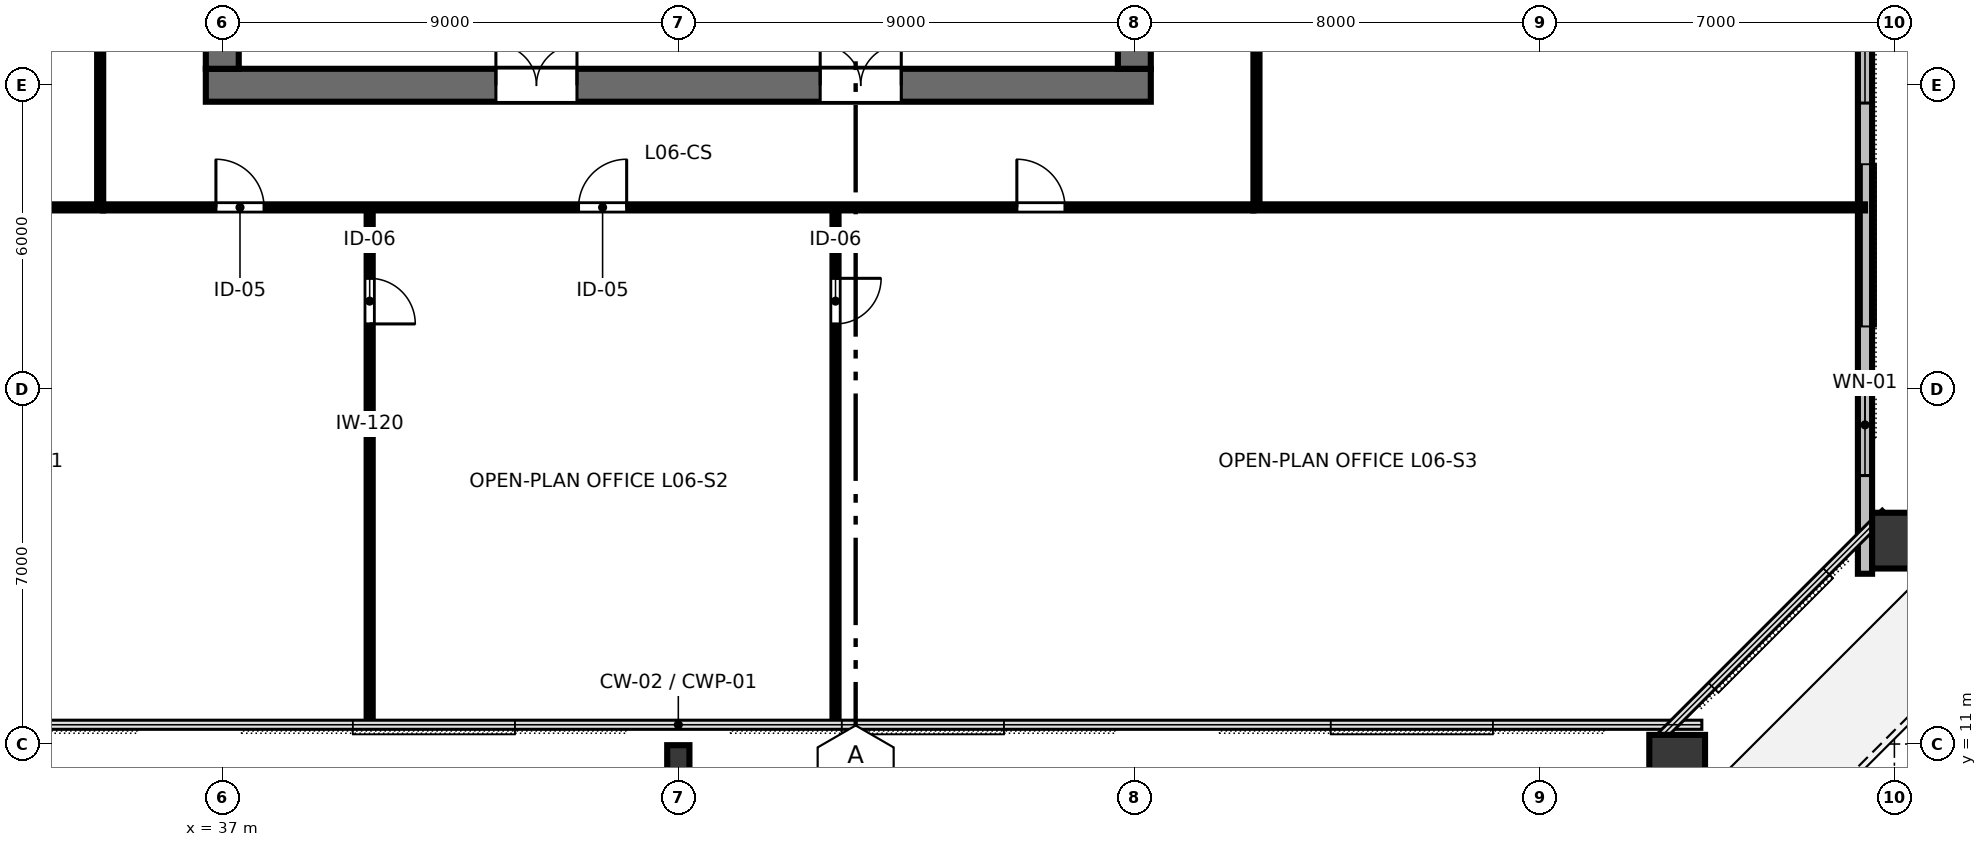
"""IFC4 building model, lengths in metres.
Left out: names, types, materials, properties, quantities, classifications, styles, units other than length and angle.
Written with IfcOpenShell. Run it as: python <this file> out.ifc"""

import sys

from ifc_helpers import new_model, si_unit, direction, frame, frame_2d, origin, origin_2d, place, context, subcontext, project, spatial, rectangle, hollow_rectangle, i_section, extrude, element, fill, save


model = new_model("IFC4")
c1 = context("Model", 3, precision=1e-05, world=origin(), true_north=direction((0.0, 1.0)))
c2 = subcontext(c1, "Body", "Model", "MODEL_VIEW")
j1 = project(units=[si_unit("LENGTHUNIT", "METRE"), si_unit("PLANEANGLEUNIT", "RADIAN")], contexts=[c1])
p1 = place(None, origin())
s1 = spatial("IfcSite", under=j1, at=p1, CompositionType="ELEMENT")
p2 = place(p1, origin())
s2 = spatial("IfcBuilding", under=s1, at=p2, CompositionType="ELEMENT")
p3 = place(p2, frame((0.0, 0.0, 28.0)))
s3 = spatial("IfcBuildingStorey", under=s2, at=p3, CompositionType="ELEMENT", Elevation=28.0)
p4 = place(p3, frame((36.675, 24.0, 0.0), z_axis=(0.0, 0.0, 1.0), x_axis=(1.0, 0.0, 0.0)))
e1 = element("IfcWall", 1, at=p4, inside=s3, PredefinedType="SHEAR", context=c2, shape_type="SweptSolid", body=[
    extrude(rectangle(XDim=18.65, YDim=0.65, at=frame_2d((9.325, 0.0))), origin(), (0.0, 0.0, 1.0), 3.36),
])
p5 = place(p4, frame((5.725, 0.0, 0.0)))
e2 = element("IfcOpeningElement", 2, at=p5, cuts=e1, PredefinedType="OPENING", context=c2, shape_type="SweptSolid", body=[
    extrude(rectangle(XDim=1.6, YDim=2.15, at=frame_2d((0.8, 1.075))), frame((0.0, 0.335, 0.0), z_axis=(0.0, -1.0, 0.0), x_axis=(1.0, 0.0, 0.0)), (0.0, 0.0, 1.0), 0.67),
])
p6 = place(p4, frame((12.125, 0.0, 0.0)))
e3 = element("IfcOpeningElement", 3, at=p6, cuts=e1, PredefinedType="OPENING", context=c2, shape_type="SweptSolid", body=[
    extrude(rectangle(XDim=1.6, YDim=2.15, at=frame_2d((0.8, 1.075))), frame((0.0, 0.335, 0.0), z_axis=(0.0, -1.0, 0.0), x_axis=(1.0, 0.0, 0.0)), (0.0, 0.0, 1.0), 0.67),
])
p7 = place(p3, frame((37.0, 24.325, 0.0), z_axis=(0.0, 0.0, 1.0), x_axis=(0.0, 1.0, 0.0)))
e4 = element("IfcWall", 4, at=p7, inside=s3, PredefinedType="SHEAR", context=c2, shape_type="SweptSolid", body=[
    extrude(rectangle(XDim=15.35, YDim=0.65, at=frame_2d((7.675, 0.0))), origin(), (0.0, 0.0, 1.0), 3.36),
])
p8 = place(p7, frame((5.2, 0.0, 0.0)))
e5 = element("IfcOpeningElement", 5, at=p8, cuts=e4, PredefinedType="OPENING", context=c2, shape_type="SweptSolid", body=[
    extrude(rectangle(XDim=1.15, YDim=2.15, at=frame_2d((0.575, 1.075))), frame((0.0, 0.335, 0.0), z_axis=(0.0, -1.0, 0.0), x_axis=(1.0, 0.0, 0.0)), (0.0, 0.0, 1.0), 0.67),
])
p9 = place(p3, frame((55.0, 24.325, 0.0), z_axis=(0.0, 0.0, 1.0), x_axis=(0.0, 1.0, 0.0)))
e6 = element("IfcWall", 6, at=p9, inside=s3, PredefinedType="SHEAR", context=c2, shape_type="SweptSolid", body=[
    extrude(rectangle(XDim=15.35, YDim=0.65, at=frame_2d((7.675, 0.0))), origin(), (0.0, 0.0, 1.0), 3.36),
])
p10 = place(p9, frame((5.2, 0.0, 0.0)))
e7 = element("IfcOpeningElement", 7, at=p10, cuts=e6, PredefinedType="OPENING", context=c2, shape_type="SweptSolid", body=[
    extrude(rectangle(XDim=1.15, YDim=2.15, at=frame_2d((0.575, 1.075))), frame((0.0, 0.335, 0.0), z_axis=(0.0, -1.0, 0.0), x_axis=(1.0, 0.0, 0.0)), (0.0, 0.0, 1.0), 0.67),
])
p11 = place(p3, frame((46.0, 10.72, 0.0), z_axis=(0.0, 0.0, 1.0), x_axis=(1.0, 0.0, 0.0)))
e8 = element("IfcColumn", 8, at=p11, inside=s3, PredefinedType="COLUMN", context=c2, shape_type="SweptSolid", body=[
    extrude(i_section(OverallWidth=0.439, OverallDepth=0.514, WebThickness=0.06, FlangeThickness=0.097, FilletRadius=0.025, at=origin_2d()), origin(), (0.0, 0.0, 1.0), 3.358),
])
for number, where, z_axis, x_axis in (
    (9, (65.713, 10.531, 0.0), (0.0, 0.0, 1.0), (1.0, 0.0, 0.0)),
    (10, (70.211, 15.013, 0.0), (0.0, 0.0, 1.0), (0.0, 1.0, 0.0)),
):
    element("IfcColumn", number, at=place(p3, frame(where, z_axis=z_axis, x_axis=x_axis)), inside=s3, PredefinedType="COLUMN", context=c2, shape_type="SweptSolid", body=[
        extrude(hollow_rectangle(XDim=1.1, YDim=1.3, WallThickness=0.07, at=origin_2d()), origin(), (0.0, 0.0, 1.0), 3.358),
    ])
p12 = place(p3, frame((69.42, 14.36, 0.0), z_axis=(0.0, 0.0, 1.0), x_axis=(0.0, 1.0, 0.0)))
e11 = element("IfcWall", 11, at=p12, inside=s3, PredefinedType="STANDARD", context=c2, shape_type="SweptSolid", body=[
    extrude(rectangle(XDim=35.28, YDim=0.28, at=frame_2d((17.64, 0.0))), origin(), (0.0, 0.0, 1.0), 3.36),
])
p13 = place(p12, frame((22.04, 0.0, 0.0)))
e12 = element("IfcOpeningElement", 12, at=p13, cuts=e11, PredefinedType="OPENING", context=c2, shape_type="SweptSolid", body=[
    extrude(rectangle(XDim=1.6, YDim=2.15, at=frame_2d((0.8, 1.075))), frame((0.0, 0.15, 0.0), z_axis=(0.0, -1.0, 0.0), x_axis=(1.0, 0.0, 0.0)), (0.0, 0.0, 1.0), 0.3),
])
p14 = place(p12, frame((1.938, 0.0, 0.8)))
e13 = element("IfcOpeningElement", 13, at=p14, cuts=e11, PredefinedType="OPENING", context=c2, shape_type="SweptSolid", body=[
    extrude(rectangle(XDim=2.0, YDim=1.95, at=frame_2d((1.0, 0.975))), frame((0.0, 0.15, 0.0), z_axis=(0.0, -1.0, 0.0), x_axis=(1.0, 0.0, 0.0)), (0.0, 0.0, 1.0), 0.3),
])
p15 = place(p12, frame((9.289, 0.0, 0.8)))
e14 = element("IfcOpeningElement", 14, at=p15, cuts=e11, PredefinedType="OPENING", context=c2, shape_type="SweptSolid", body=[
    extrude(rectangle(XDim=2.0, YDim=1.95, at=frame_2d((1.0, 0.975))), frame((0.0, 0.15, 0.0), z_axis=(0.0, -1.0, 0.0), x_axis=(1.0, 0.0, 0.0)), (0.0, 0.0, 1.0), 0.3),
])
p16 = place(p12, frame((12.964, 0.0, 0.8)))
e15 = element("IfcOpeningElement", 15, at=p16, cuts=e11, PredefinedType="OPENING", context=c2, shape_type="SweptSolid", body=[
    extrude(rectangle(XDim=2.0, YDim=1.95, at=frame_2d((1.0, 0.975))), frame((0.0, 0.15, 0.0), z_axis=(0.0, -1.0, 0.0), x_axis=(1.0, 0.0, 0.0)), (0.0, 0.0, 1.0), 0.3),
])
p17 = place(p12, frame((31.342, 0.0, 0.8)))
e16 = element("IfcOpeningElement", 16, at=p17, cuts=e11, PredefinedType="OPENING", context=c2, shape_type="SweptSolid", body=[
    extrude(rectangle(XDim=2.0, YDim=1.95, at=frame_2d((1.0, 0.975))), frame((0.0, 0.15, 0.0), z_axis=(0.0, -1.0, 0.0), x_axis=(1.0, 0.0, 0.0)), (0.0, 0.0, 1.0), 0.3),
])
p18 = place(p3, frame((39.909, 21.59, 0.0), z_axis=(0.0, 0.0, 1.0), x_axis=(0.0, -1.0, 0.0)))
e17 = element("IfcWall", 17, at=p18, inside=s3, PredefinedType="PARTITIONING", context=c2, shape_type="SweptSolid", body=[
    extrude(rectangle(XDim=10.21, YDim=0.12, at=frame_2d((5.105, 0.0))), origin(), (0.0, 0.0, 1.0), 2.64),
])
p19 = place(p18, frame((1.4, 0.0, 0.0)))
e18 = element("IfcOpeningElement", 18, at=p19, cuts=e17, PredefinedType="OPENING", context=c2, shape_type="SweptSolid", body=[
    extrude(rectangle(XDim=0.9, YDim=2.15, at=frame_2d((0.45, 1.075))), frame((0.0, 0.07, 0.0), z_axis=(0.0, -1.0, 0.0), x_axis=(1.0, 0.0, 0.0)), (0.0, 0.0, 1.0), 0.14),
])
p20 = place(p3, frame((49.102, 21.59, 0.0), z_axis=(0.0, 0.0, 1.0), x_axis=(0.0, -1.0, 0.0)))
e19 = element("IfcWall", 19, at=p20, inside=s3, PredefinedType="PARTITIONING", context=c2, shape_type="SweptSolid", body=[
    extrude(rectangle(XDim=10.21, YDim=0.12, at=frame_2d((5.105, 0.0))), origin(), (0.0, 0.0, 1.0), 2.64),
])
p21 = place(p20, frame((1.4, 0.0, 0.0)))
e20 = element("IfcOpeningElement", 20, at=p21, cuts=e19, PredefinedType="OPENING", context=c2, shape_type="SweptSolid", body=[
    extrude(rectangle(XDim=0.9, YDim=2.15, at=frame_2d((0.45, 1.075))), frame((0.0, 0.07, 0.0), z_axis=(0.0, -1.0, 0.0), x_axis=(1.0, 0.0, 0.0)), (0.0, 0.0, 1.0), 0.14),
])
p22 = place(p3, frame((34.65, 21.59, 0.0), z_axis=(0.0, 0.0, 1.0), x_axis=(1.0, 0.0, 0.0)))
e21 = element("IfcWall", 21, at=p22, inside=s3, PredefinedType="PARTITIONING", context=c2, shape_type="SweptSolid", body=[
    extrude(rectangle(XDim=22.7, YDim=0.12, at=frame_2d((11.35, 0.0))), origin(), (0.0, 0.0, 1.0), 2.64),
])
p23 = place(p22, frame((2.224, 0.0, 0.0)))
e22 = element("IfcOpeningElement", 22, at=p23, cuts=e21, PredefinedType="OPENING", context=c2, shape_type="SweptSolid", body=[
    extrude(rectangle(XDim=0.95, YDim=2.15, at=frame_2d((0.475, 1.075))), frame((0.0, 0.07, 0.0), z_axis=(0.0, -1.0, 0.0), x_axis=(1.0, 0.0, 0.0)), (0.0, 0.0, 1.0), 0.14),
])
p24 = place(p22, frame((9.381, 0.0, 0.0)))
e23 = element("IfcOpeningElement", 23, at=p24, cuts=e21, PredefinedType="OPENING", context=c2, shape_type="SweptSolid", body=[
    extrude(rectangle(XDim=0.95, YDim=2.15, at=frame_2d((0.475, 1.075))), frame((0.0, 0.07, 0.0), z_axis=(0.0, -1.0, 0.0), x_axis=(1.0, 0.0, 0.0)), (0.0, 0.0, 1.0), 0.14),
])
p25 = place(p22, frame((18.031, 0.0, 0.0)))
e24 = element("IfcOpeningElement", 24, at=p25, cuts=e21, PredefinedType="OPENING", context=c2, shape_type="SweptSolid", body=[
    extrude(rectangle(XDim=0.95, YDim=2.15, at=frame_2d((0.475, 1.075))), frame((0.0, 0.07, 0.0), z_axis=(0.0, -1.0, 0.0), x_axis=(1.0, 0.0, 0.0)), (0.0, 0.0, 1.0), 0.14),
])
p26 = place(p3, frame((34.59, 21.65, 0.0), z_axis=(0.0, 0.0, 1.0), x_axis=(0.0, 1.0, 0.0)))
e25 = element("IfcWall", 25, at=p26, inside=s3, PredefinedType="PARTITIONING", context=c2, shape_type="SweptSolid", body=[
    extrude(rectangle(XDim=20.7, YDim=0.12, at=frame_2d((10.35, 0.0))), origin(), (0.0, 0.0, 1.0), 2.64),
])
p27 = place(p26, frame((3.161, 0.0, 0.0)))
e26 = element("IfcOpeningElement", 26, at=p27, cuts=e25, PredefinedType="OPENING", context=c2, shape_type="SweptSolid", body=[
    extrude(rectangle(XDim=0.95, YDim=2.15, at=frame_2d((0.475, 1.075))), frame((0.0, 0.07, 0.0), z_axis=(0.0, -1.0, 0.0), x_axis=(1.0, 0.0, 0.0)), (0.0, 0.0, 1.0), 0.14),
])
p28 = place(p26, frame((13.311, 0.0, 0.0)))
e27 = element("IfcOpeningElement", 27, at=p28, cuts=e25, PredefinedType="OPENING", context=c2, shape_type="SweptSolid", body=[
    extrude(rectangle(XDim=0.95, YDim=2.15, at=frame_2d((0.475, 1.075))), frame((0.0, 0.07, 0.0), z_axis=(0.0, -1.0, 0.0), x_axis=(1.0, 0.0, 0.0)), (0.0, 0.0, 1.0), 0.14),
])
p29 = place(p3, frame((57.41, 21.65, 0.0), z_axis=(0.0, 0.0, 1.0), x_axis=(0.0, 1.0, 0.0)))
e28 = element("IfcWall", 28, at=p29, inside=s3, PredefinedType="PARTITIONING", context=c2, shape_type="SweptSolid", body=[
    extrude(rectangle(XDim=20.7, YDim=0.12, at=frame_2d((10.35, 0.0))), origin(), (0.0, 0.0, 1.0), 2.64),
])
p30 = place(p29, frame((5.31, 0.0, 0.0)))
e29 = element("IfcOpeningElement", 29, at=p30, cuts=e28, PredefinedType="OPENING", context=c2, shape_type="SweptSolid", body=[
    extrude(rectangle(XDim=0.95, YDim=2.15, at=frame_2d((0.475, 1.075))), frame((0.0, 0.07, 0.0), z_axis=(0.0, -1.0, 0.0), x_axis=(1.0, 0.0, 0.0)), (0.0, 0.0, 1.0), 0.14),
])
p31 = place(p29, frame((15.459, 0.0, 0.0)))
e30 = element("IfcOpeningElement", 30, at=p31, cuts=e28, PredefinedType="OPENING", context=c2, shape_type="SweptSolid", body=[
    extrude(rectangle(XDim=0.95, YDim=2.15, at=frame_2d((0.475, 1.075))), frame((0.0, 0.07, 0.0), z_axis=(0.0, -1.0, 0.0), x_axis=(1.0, 0.0, 0.0)), (0.0, 0.0, 1.0), 0.14),
])
for number, where, z_axis, x_axis in (
    (31, (34.65, 21.59, 0.0), (0.0, 0.0, 1.0), (-1.0, 0.0, 0.0)),
    (32, (57.35, 21.59, 0.0), (0.0, 0.0, 1.0), (1.0, 0.0, 0.0)),
):
    element("IfcWall", number, at=place(p3, frame(where, z_axis=z_axis, x_axis=x_axis)), inside=s3, PredefinedType="PARTITIONING", context=c2, shape_type="SweptSolid", body=[
        extrude(rectangle(XDim=12.07, YDim=0.12, at=frame_2d((6.035, 0.0))), origin(), (0.0, 0.0, 1.0), 2.64),
    ])
p32 = place(p14, origin())
e33 = element("IfcWindow", 33, at=p32, inside=s3, PartitioningType="SINGLE_PANEL", PredefinedType="WINDOW", context=c2, shape_type="SweptSolid", body=[
    extrude(rectangle(XDim=2.0, YDim=1.95, at=frame_2d((1.0, 0.975))), frame((0.0, 0.03, 0.0), z_axis=(0.0, -1.0, 0.0), x_axis=(1.0, 0.0, 0.0)), (0.0, 0.0, 1.0), 0.06),
])
fill(e13, e33)
p33 = place(p15, origin())
e34 = element("IfcWindow", 34, at=p33, inside=s3, PartitioningType="SINGLE_PANEL", PredefinedType="WINDOW", context=c2, shape_type="SweptSolid", body=[
    extrude(rectangle(XDim=2.0, YDim=1.95, at=frame_2d((1.0, 0.975))), frame((0.0, 0.03, 0.0), z_axis=(0.0, -1.0, 0.0), x_axis=(1.0, 0.0, 0.0)), (0.0, 0.0, 1.0), 0.06),
])
fill(e14, e34)
p34 = place(p5, origin())
e35 = element("IfcDoor", 35, at=p34, inside=s3, OperationType="DOUBLE_DOOR_SINGLE_SWING", PredefinedType="DOOR", context=c2, shape_type="SweptSolid", body=[
    extrude(rectangle(XDim=1.6, YDim=2.15, at=frame_2d((0.8, 1.075))), frame((0.0, 0.025, 0.0), z_axis=(0.0, -1.0, 0.0), x_axis=(1.0, 0.0, 0.0)), (0.0, 0.0, 1.0), 0.05),
])
fill(e2, e35)
p35 = place(p6, origin())
e36 = element("IfcDoor", 36, at=p35, inside=s3, OperationType="DOUBLE_DOOR_SINGLE_SWING", PredefinedType="DOOR", context=c2, shape_type="SweptSolid", body=[
    extrude(rectangle(XDim=1.6, YDim=2.15, at=frame_2d((0.8, 1.075))), frame((0.0, 0.025, 0.0), z_axis=(0.0, -1.0, 0.0), x_axis=(1.0, 0.0, 0.0)), (0.0, 0.0, 1.0), 0.05),
])
fill(e3, e36)
p36 = place(p19, origin())
e37 = element("IfcDoor", 37, at=p36, inside=s3, OperationType="SINGLE_SWING_RIGHT", PredefinedType="DOOR", context=c2, shape_type="SweptSolid", body=[
    extrude(rectangle(XDim=0.9, YDim=2.15, at=frame_2d((0.45, 1.075))), frame((0.0, 0.025, 0.0), z_axis=(0.0, -1.0, 0.0), x_axis=(1.0, 0.0, 0.0)), (0.0, 0.0, 1.0), 0.05),
])
fill(e18, e37)
p37 = place(p21, origin())
e38 = element("IfcDoor", 38, at=p37, inside=s3, OperationType="SINGLE_SWING_LEFT", PredefinedType="DOOR", context=c2, shape_type="SweptSolid", body=[
    extrude(rectangle(XDim=0.9, YDim=2.15, at=frame_2d((0.45, 1.075))), frame((0.0, 0.025, 0.0), z_axis=(0.0, -1.0, 0.0), x_axis=(1.0, 0.0, 0.0)), (0.0, 0.0, 1.0), 0.05),
])
fill(e20, e38)
p38 = place(p23, origin())
e39 = element("IfcDoor", 39, at=p38, inside=s3, OperationType="SINGLE_SWING_LEFT", PredefinedType="DOOR", context=c2, shape_type="SweptSolid", body=[
    extrude(rectangle(XDim=0.95, YDim=2.15, at=frame_2d((0.475, 1.075))), frame((0.0, 0.025, 0.0), z_axis=(0.0, -1.0, 0.0), x_axis=(1.0, 0.0, 0.0)), (0.0, 0.0, 1.0), 0.05),
])
fill(e22, e39)
p39 = place(p24, origin())
e40 = element("IfcDoor", 40, at=p39, inside=s3, OperationType="SINGLE_SWING_RIGHT", PredefinedType="DOOR", context=c2, shape_type="SweptSolid", body=[
    extrude(rectangle(XDim=0.95, YDim=2.15, at=frame_2d((0.475, 1.075))), frame((0.0, 0.025, 0.0), z_axis=(0.0, -1.0, 0.0), x_axis=(1.0, 0.0, 0.0)), (0.0, 0.0, 1.0), 0.05),
])
fill(e23, e40)
p40 = place(p25, origin())
e41 = element("IfcDoor", 41, at=p40, inside=s3, OperationType="SINGLE_SWING_LEFT", PredefinedType="DOOR", context=c2, shape_type="SweptSolid", body=[
    extrude(rectangle(XDim=0.95, YDim=2.15, at=frame_2d((0.475, 1.075))), frame((0.0, 0.025, 0.0), z_axis=(0.0, -1.0, 0.0), x_axis=(1.0, 0.0, 0.0)), (0.0, 0.0, 1.0), 0.05),
])
fill(e24, e41)
save(model, sys.argv[1])
